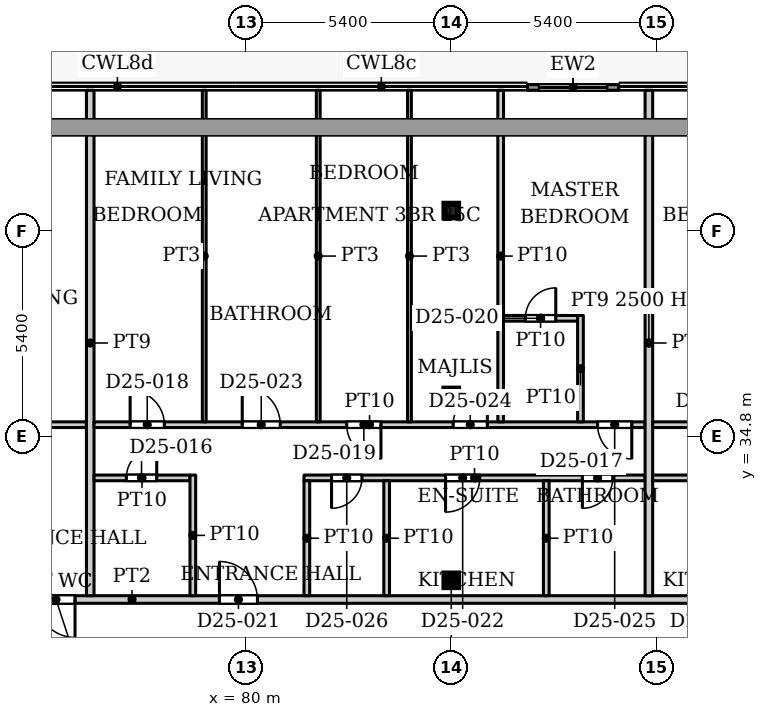
"""IFC4 building model, lengths in metres.
Left out: names, types, materials, properties, quantities, classifications, styles, units other than length and angle.
Written with IfcOpenShell. Run it as: python <this file> out.ifc"""

import sys

from ifc_helpers import new_model, si_unit, direction, frame, frame_2d, origin, origin_2d, place, context, subcontext, project, spatial, rectangle, hollow_rectangle, extrude, source, transform, mapped, element, fill, save


model = new_model("IFC4")
c1 = context("Model", 3, precision=1e-05, world=origin(), true_north=direction((0.0, 1.0)))
c2 = subcontext(c1, "Body", "Model", "MODEL_VIEW")
j1 = project(units=[si_unit("LENGTHUNIT", "METRE"), si_unit("PLANEANGLEUNIT", "RADIAN")], contexts=[c1])
p1 = place(None, origin())
s1 = spatial("IfcSite", under=j1, at=p1, CompositionType="ELEMENT")
p2 = place(p1, origin())
s2 = spatial("IfcBuilding", under=s1, at=p2, CompositionType="ELEMENT")
p3 = place(p2, frame((0.0, 0.0, 109.7)))
s3 = spatial("IfcBuildingStorey", under=s2, at=p3, CompositionType="ELEMENT", Elevation=109.7)
for number, where, z_axis, x_axis in (
    (1, (85.4, 31.005, 0.0), (0.0, 0.0, 1.0), (1.0, 0.0, 0.0)),
    (2, (85.4, 35.87, 0.0), (0.0, 0.0, 1.0), (1.0, 0.0, 0.0)),
    (3, (85.4, 40.735, 0.0), (0.0, 0.0, 1.0), (1.0, 0.0, 0.0)),
):
    element("IfcColumn", number, at=place(p3, frame(where, z_axis=z_axis, x_axis=x_axis)), inside=s3, PredefinedType="COLUMN", context=c2, shape_type="SweptSolid", body=[
        extrude(hollow_rectangle(XDim=0.356, YDim=0.356, WallThickness=0.016, InnerFilletRadius=0.016, OuterFilletRadius=0.032, at=origin_2d()), origin(), (0.0, 0.0, 1.0), 3.9),
    ])
p4 = place(p3, frame((87.406, 43.975, 0.0), z_axis=(0.0, 0.0, 1.0), x_axis=(1.0, 0.0, 0.0)))
e4 = element("IfcWall", 4, at=p4, inside=s3, PredefinedType="SOLIDWALL", context=c2, shape_type="SweptSolid", body=[
    extrude(rectangle(XDim=2.4, YDim=0.15, at=frame_2d((1.2, 0.0))), origin(), (0.0, 0.0, 1.0), 3.75),
])
p5 = place(p4, frame((0.3, 0.0, 0.0)))
e5 = element("IfcOpeningElement", 5, at=p5, cuts=e4, PredefinedType="OPENING", context=c2, shape_type="SweptSolid", body=[
    extrude(rectangle(XDim=1.8, YDim=2.4, at=frame_2d((0.9, 1.2))), frame((0.0, 0.085, 0.0), z_axis=(0.0, -1.0, 0.0), x_axis=(1.0, 0.0, 0.0)), (0.0, 0.0, 1.0), 0.17),
])
p6 = place(p3, frame((55.9, 30.5, 0.0), z_axis=(0.0, 0.0, 1.0), x_axis=(1.0, 0.0, 0.0)))
e6 = element("IfcWall", 6, at=p6, inside=s3, PredefinedType="PARTITIONING", context=c2, shape_type="SweptSolid", body=[
    extrude(rectangle(XDim=42.2, YDim=0.2, at=frame_2d((21.1, 0.0))), origin(), (0.0, 0.0, 1.0), 3.6),
])
p7 = place(p6, frame((9.75, 0.0, 0.0)))
e7 = element("IfcOpeningElement", 7, at=p7, cuts=e6, PredefinedType="OPENING", context=c2, shape_type="SweptSolid", body=[
    extrude(rectangle(XDim=1.0, YDim=2.1, at=frame_2d((0.5, 1.05))), frame((0.0, 0.11, 0.0), z_axis=(0.0, -1.0, 0.0), x_axis=(1.0, 0.0, 0.0)), (0.0, 0.0, 1.0), 0.22),
])
p8 = place(p6, frame((18.6, 0.0, 0.0)))
e8 = element("IfcOpeningElement", 8, at=p8, cuts=e6, PredefinedType="OPENING", context=c2, shape_type="SweptSolid", body=[
    extrude(rectangle(XDim=1.0, YDim=2.1, at=frame_2d((0.5, 1.05))), frame((0.0, 0.11, 0.0), z_axis=(0.0, -1.0, 0.0), x_axis=(1.0, 0.0, 0.0)), (0.0, 0.0, 1.0), 0.22),
])
p9 = place(p6, frame((23.4, 0.0, 0.0)))
e9 = element("IfcOpeningElement", 9, at=p9, cuts=e6, PredefinedType="OPENING", context=c2, shape_type="SweptSolid", body=[
    extrude(rectangle(XDim=1.0, YDim=2.1, at=frame_2d((0.5, 1.05))), frame((0.0, 0.11, 0.0), z_axis=(0.0, -1.0, 0.0), x_axis=(1.0, 0.0, 0.0)), (0.0, 0.0, 1.0), 0.22),
])
p10 = place(p6, frame((40.2, 0.0, 0.0)))
e10 = element("IfcOpeningElement", 10, at=p10, cuts=e6, PredefinedType="OPENING", context=c2, shape_type="SweptSolid", body=[
    extrude(rectangle(XDim=1.0, YDim=2.1, at=frame_2d((0.5, 1.05))), frame((0.0, 0.11, 0.0), z_axis=(0.0, -1.0, 0.0), x_axis=(1.0, 0.0, 0.0)), (0.0, 0.0, 1.0), 0.22),
])
p11 = place(p3, frame((67.3, 35.1, 0.0), z_axis=(0.0, 0.0, 1.0), x_axis=(1.0, 0.0, 0.0)))
e11 = element("IfcWall", 11, at=p11, inside=s3, PredefinedType="PARTITIONING", context=c2, shape_type="SweptSolid", body=[
    extrude(rectangle(XDim=8.5, YDim=0.15, at=frame_2d((4.25, 0.0))), origin(), (0.0, 0.0, 1.0), 3.6),
])
p12 = place(p11, frame((1.0, 0.0, 0.0)))
e12 = element("IfcOpeningElement", 12, at=p12, cuts=e11, PredefinedType="OPENING", context=c2, shape_type="SweptSolid", body=[
    extrude(rectangle(XDim=0.9, YDim=2.1, at=frame_2d((0.45, 1.05))), frame((0.0, 0.085, 0.0), z_axis=(0.0, -1.0, 0.0), x_axis=(1.0, 0.0, 0.0)), (0.0, 0.0, 1.0), 0.17),
])
p13 = place(p11, frame((5.7, 0.0, 0.0)))
e13 = element("IfcOpeningElement", 13, at=p13, cuts=e11, PredefinedType="OPENING", context=c2, shape_type="SweptSolid", body=[
    extrude(rectangle(XDim=1.0, YDim=2.1, at=frame_2d((0.5, 1.05))), frame((0.0, 0.085, 0.0), z_axis=(0.0, -1.0, 0.0), x_axis=(1.0, 0.0, 0.0)), (0.0, 0.0, 1.0), 0.17),
])
p14 = place(p3, frame((75.9, 30.6, 0.0), z_axis=(0.0, 0.0, 1.0), x_axis=(0.0, 1.0, 0.0)))
e14 = element("IfcWall", 14, at=p14, inside=s3, PredefinedType="PARTITIONING", context=c2, shape_type="SweptSolid", body=[
    extrude(rectangle(XDim=13.3, YDim=0.2, at=frame_2d((6.65, 0.0))), origin(), (0.0, 0.0, 1.0), 3.6),
])
p15 = place(p3, frame((76.0, 33.7, 0.0), z_axis=(0.0, 0.0, 1.0), x_axis=(1.0, 0.0, 0.0)))
e15 = element("IfcWall", 15, at=p15, inside=s3, PredefinedType="PARTITIONING", context=c2, shape_type="SweptSolid", body=[
    extrude(rectangle(XDim=2.525, YDim=0.15, at=frame_2d((1.262, 0.0))), origin(), (0.0, 0.0, 1.0), 3.6),
])
p16 = place(p15, frame((0.85, 0.0, 0.0)))
e16 = element("IfcOpeningElement", 16, at=p16, cuts=e15, PredefinedType="OPENING", context=c2, shape_type="SweptSolid", body=[
    extrude(rectangle(XDim=0.8, YDim=2.1, at=frame_2d((0.4, 1.05))), frame((0.0, 0.085, 0.0), z_axis=(0.0, -1.0, 0.0), x_axis=(1.0, 0.0, 0.0)), (0.0, 0.0, 1.0), 0.17),
])
p17 = place(p3, frame((76.0, 35.1, 0.0), z_axis=(0.0, 0.0, 1.0), x_axis=(1.0, 0.0, 0.0)))
e17 = element("IfcWall", 17, at=p17, inside=s3, PredefinedType="PARTITIONING", context=c2, shape_type="SweptSolid", body=[
    extrude(rectangle(XDim=14.5, YDim=0.15, at=frame_2d((7.25, 0.0))), origin(), (0.0, 0.0, 1.0), 3.6),
])
p18 = place(p17, frame((0.95, 0.0, 0.0)))
e18 = element("IfcOpeningElement", 18, at=p18, cuts=e17, PredefinedType="OPENING", context=c2, shape_type="SweptSolid", body=[
    extrude(rectangle(XDim=0.9, YDim=2.1, at=frame_2d((0.45, 1.05))), frame((0.0, 0.085, 0.0), z_axis=(0.0, -1.0, 0.0), x_axis=(1.0, 0.0, 0.0)), (0.0, 0.0, 1.0), 0.17),
])
p19 = place(p17, frame((6.65, 0.0, 0.0)))
e19 = element("IfcOpeningElement", 19, at=p19, cuts=e17, PredefinedType="OPENING", context=c2, shape_type="SweptSolid", body=[
    extrude(rectangle(XDim=0.9, YDim=2.1, at=frame_2d((0.45, 1.05))), frame((0.0, 0.085, 0.0), z_axis=(0.0, -1.0, 0.0), x_axis=(1.0, 0.0, 0.0)), (0.0, 0.0, 1.0), 0.17),
])
p20 = place(p17, frame((3.9, 0.0, 0.0)))
e20 = element("IfcOpeningElement", 20, at=p20, cuts=e17, PredefinedType="OPENING", context=c2, shape_type="SweptSolid", body=[
    extrude(rectangle(XDim=1.0, YDim=2.1, at=frame_2d((0.5, 1.05))), frame((0.0, 0.085, 0.0), z_axis=(0.0, -1.0, 0.0), x_axis=(1.0, 0.0, 0.0)), (0.0, 0.0, 1.0), 0.17),
])
p21 = place(p17, frame((9.45, 0.0, 0.0)))
e21 = element("IfcOpeningElement", 21, at=p21, cuts=e17, PredefinedType="OPENING", context=c2, shape_type="SweptSolid", body=[
    extrude(rectangle(XDim=0.9, YDim=2.1, at=frame_2d((0.45, 1.05))), frame((0.0, 0.085, 0.0), z_axis=(0.0, -1.0, 0.0), x_axis=(1.0, 0.0, 0.0)), (0.0, 0.0, 1.0), 0.17),
])
p22 = place(p17, frame((13.25, 0.0, 0.0)))
e22 = element("IfcOpeningElement", 22, at=p22, cuts=e17, PredefinedType="OPENING", context=c2, shape_type="SweptSolid", body=[
    extrude(rectangle(XDim=0.9, YDim=2.1, at=frame_2d((0.45, 1.05))), frame((0.0, 0.085, 0.0), z_axis=(0.0, -1.0, 0.0), x_axis=(1.0, 0.0, 0.0)), (0.0, 0.0, 1.0), 0.17),
])
p23 = place(p3, frame((78.6, 30.6, 0.0), z_axis=(0.0, 0.0, 1.0), x_axis=(0.0, 1.0, 0.0)))
e23 = element("IfcWall", 23, at=p23, inside=s3, PredefinedType="PARTITIONING", context=c2, shape_type="SweptSolid", body=[
    extrude(rectangle(XDim=3.175, YDim=0.15, at=frame_2d((1.587, 0.0))), origin(), (0.0, 0.0, 1.0), 3.6),
])
p24 = place(p3, frame((78.9, 35.175, 0.0), z_axis=(0.0, 0.0, 1.0), x_axis=(0.0, 1.0, 0.0)))
e24 = element("IfcWall", 24, at=p24, inside=s3, PredefinedType="PARTITIONING", context=c2, shape_type="SweptSolid", body=[
    extrude(rectangle(XDim=8.725, YDim=0.1, at=frame_2d((4.362, 0.0))), origin(), (0.0, 0.0, 1.0), 3.6),
])
p25 = place(p3, frame((81.525, 33.7, 0.0), z_axis=(0.0, 0.0, 1.0), x_axis=(1.0, 0.0, 0.0)))
e25 = element("IfcWall", 25, at=p25, inside=s3, PredefinedType="PARTITIONING", context=c2, shape_type="SweptSolid", body=[
    extrude(rectangle(XDim=8.975, YDim=0.15, at=frame_2d((4.488, 0.0))), origin(), (0.0, 0.0, 1.0), 3.6),
])
p26 = place(p25, frame((7.325, 0.0, 0.0)))
e26 = element("IfcOpeningElement", 26, at=p26, cuts=e25, PredefinedType="OPENING", context=c2, shape_type="SweptSolid", body=[
    extrude(rectangle(XDim=0.8, YDim=2.1, at=frame_2d((0.4, 1.05))), frame((0.0, 0.085, 0.0), z_axis=(0.0, -1.0, 0.0), x_axis=(1.0, 0.0, 0.0)), (0.0, 0.0, 1.0), 0.17),
])
p27 = place(p25, frame((3.725, 0.0, 0.0)))
e27 = element("IfcOpeningElement", 27, at=p27, cuts=e25, PredefinedType="OPENING", context=c2, shape_type="SweptSolid", body=[
    extrude(rectangle(XDim=0.9, YDim=2.1, at=frame_2d((0.45, 1.05))), frame((0.0, 0.085, 0.0), z_axis=(0.0, -1.0, 0.0), x_axis=(1.0, 0.0, 0.0)), (0.0, 0.0, 1.0), 0.17),
])
p28 = place(p25, frame((0.725, 0.0, 0.0)))
e28 = element("IfcOpeningElement", 28, at=p28, cuts=e25, PredefinedType="OPENING", context=c2, shape_type="SweptSolid", body=[
    extrude(rectangle(XDim=0.8, YDim=2.1, at=frame_2d((0.4, 1.05))), frame((0.0, 0.085, 0.0), z_axis=(0.0, -1.0, 0.0), x_axis=(1.0, 0.0, 0.0)), (0.0, 0.0, 1.0), 0.17),
])
p29 = place(p3, frame((81.6, 30.6, 0.0), z_axis=(0.0, 0.0, 1.0), x_axis=(0.0, 1.0, 0.0)))
e29 = element("IfcWall", 29, at=p29, inside=s3, PredefinedType="PARTITIONING", context=c2, shape_type="SweptSolid", body=[
    extrude(rectangle(XDim=3.025, YDim=0.15, at=frame_2d((1.512, 0.0))), origin(), (0.0, 0.0, 1.0), 3.6),
])
p30 = place(p3, frame((81.9, 35.175, 0.0), z_axis=(0.0, 0.0, 1.0), x_axis=(0.0, 1.0, 0.0)))
e30 = element("IfcWall", 30, at=p30, inside=s3, PredefinedType="PARTITIONING", context=c2, shape_type="SweptSolid", body=[
    extrude(rectangle(XDim=8.725, YDim=0.1, at=frame_2d((4.362, 0.0))), origin(), (0.0, 0.0, 1.0), 3.6),
])
p31 = place(p3, frame((83.7, 30.6, 0.0), z_axis=(0.0, 0.0, 1.0), x_axis=(0.0, 1.0, 0.0)))
e31 = element("IfcWall", 31, at=p31, inside=s3, PredefinedType="PARTITIONING", context=c2, shape_type="SweptSolid", body=[
    extrude(rectangle(XDim=3.025, YDim=0.15, at=frame_2d((1.512, 0.0))), origin(), (0.0, 0.0, 1.0), 3.6),
])
p32 = place(p3, frame((84.3, 35.175, 0.0), z_axis=(0.0, 0.0, 1.0), x_axis=(0.0, 1.0, 0.0)))
e32 = element("IfcWall", 32, at=p32, inside=s3, PredefinedType="PARTITIONING", context=c2, shape_type="SweptSolid", body=[
    extrude(rectangle(XDim=8.725, YDim=0.1, at=frame_2d((4.362, 0.0))), origin(), (0.0, 0.0, 1.0), 3.6),
])
p33 = place(p3, frame((86.7, 35.175, 0.0), z_axis=(0.0, 0.0, 1.0), x_axis=(0.0, 1.0, 0.0)))
e33 = element("IfcWall", 33, at=p33, inside=s3, PredefinedType="PARTITIONING", context=c2, shape_type="SweptSolid", body=[
    extrude(rectangle(XDim=8.725, YDim=0.15, at=frame_2d((4.362, 0.0))), origin(), (0.0, 0.0, 1.0), 3.6),
])
p34 = place(p3, frame((86.775, 37.9, 0.0), z_axis=(0.0, 0.0, 1.0), x_axis=(1.0, 0.0, 0.0)))
e34 = element("IfcWall", 34, at=p34, inside=s3, PredefinedType="PARTITIONING", context=c2, shape_type="SweptSolid", body=[
    extrude(rectangle(XDim=1.95, YDim=0.15, at=frame_2d((0.975, 0.0))), origin(), (0.0, 0.0, 1.0), 3.6),
])
p35 = place(p34, frame((0.575, 0.0, 0.0)))
e35 = element("IfcOpeningElement", 35, at=p35, cuts=e34, PredefinedType="OPENING", context=c2, shape_type="SweptSolid", body=[
    extrude(rectangle(XDim=0.8, YDim=2.1, at=frame_2d((0.4, 1.05))), frame((0.0, 0.085, 0.0), z_axis=(0.0, -1.0, 0.0), x_axis=(1.0, 0.0, 0.0)), (0.0, 0.0, 1.0), 0.17),
])
p36 = place(p3, frame((87.9, 30.6, 0.0), z_axis=(0.0, 0.0, 1.0), x_axis=(0.0, 1.0, 0.0)))
e36 = element("IfcWall", 36, at=p36, inside=s3, PredefinedType="PARTITIONING", context=c2, shape_type="SweptSolid", body=[
    extrude(rectangle(XDim=3.025, YDim=0.15, at=frame_2d((1.512, 0.0))), origin(), (0.0, 0.0, 1.0), 3.6),
])
p37 = place(p3, frame((88.8, 35.175, 0.0), z_axis=(0.0, 0.0, 1.0), x_axis=(0.0, 1.0, 0.0)))
e37 = element("IfcWall", 37, at=p37, inside=s3, PredefinedType="PARTITIONING", context=c2, shape_type="SweptSolid", body=[
    extrude(rectangle(XDim=2.8, YDim=0.15, at=frame_2d((1.4, 0.0))), origin(), (0.0, 0.0, 1.0), 3.6),
])
p38 = place(p3, frame((90.6, 30.6, 0.0), z_axis=(0.0, 0.0, 1.0), x_axis=(0.0, 1.0, 0.0)))
e38 = element("IfcWall", 38, at=p38, inside=s3, PredefinedType="PARTITIONING", context=c2, shape_type="SweptSolid", body=[
    extrude(rectangle(XDim=13.3, YDim=0.2, at=frame_2d((6.65, 0.0))), origin(), (0.0, 0.0, 1.0), 2.5),
])
p39 = place(p3, frame((90.7, 33.7, 0.0), z_axis=(0.0, 0.0, 1.0), x_axis=(1.0, 0.0, 0.0)))
e39 = element("IfcWall", 39, at=p39, inside=s3, PredefinedType="PARTITIONING", context=c2, shape_type="SweptSolid", body=[
    extrude(rectangle(XDim=5.075, YDim=0.15, at=frame_2d((2.538, 0.0))), origin(), (0.0, 0.0, 1.0), 3.6),
])
p40 = place(p39, frame((1.1, 0.0, 0.0)))
e40 = element("IfcOpeningElement", 40, at=p40, cuts=e39, PredefinedType="OPENING", context=c2, shape_type="SweptSolid", body=[
    extrude(rectangle(XDim=0.9, YDim=2.1, at=frame_2d((0.45, 1.05))), frame((0.0, 0.085, 0.0), z_axis=(0.0, -1.0, 0.0), x_axis=(1.0, 0.0, 0.0)), (0.0, 0.0, 1.0), 0.17),
])
p41 = place(p39, frame((3.7, 0.0, 0.0)))
e41 = element("IfcOpeningElement", 41, at=p41, cuts=e39, PredefinedType="OPENING", context=c2, shape_type="SweptSolid", body=[
    extrude(rectangle(XDim=0.8, YDim=2.1, at=frame_2d((0.4, 1.05))), frame((0.0, 0.085, 0.0), z_axis=(0.0, -1.0, 0.0), x_axis=(1.0, 0.0, 0.0)), (0.0, 0.0, 1.0), 0.17),
])
p42 = place(p3, frame((90.7, 35.1, 0.0), z_axis=(0.0, 0.0, 1.0), x_axis=(1.0, 0.0, 0.0)))
e42 = element("IfcWall", 42, at=p42, inside=s3, PredefinedType="PARTITIONING", context=c2, shape_type="SweptSolid", body=[
    extrude(rectangle(XDim=9.2, YDim=0.15, at=frame_2d((4.6, 0.0))), origin(), (0.0, 0.0, 1.0), 3.6),
])
p43 = place(p42, frame((1.25, 0.0, 0.0)))
e43 = element("IfcOpeningElement", 43, at=p43, cuts=e42, PredefinedType="OPENING", context=c2, shape_type="SweptSolid", body=[
    extrude(rectangle(XDim=0.9, YDim=2.1, at=frame_2d((0.45, 1.05))), frame((0.0, 0.085, 0.0), z_axis=(0.0, -1.0, 0.0), x_axis=(1.0, 0.0, 0.0)), (0.0, 0.0, 1.0), 0.17),
])
p44 = place(p42, frame((5.85, 0.0, 0.0)))
e44 = element("IfcOpeningElement", 44, at=p44, cuts=e42, PredefinedType="OPENING", context=c2, shape_type="SweptSolid", body=[
    extrude(rectangle(XDim=1.0, YDim=2.1, at=frame_2d((0.5, 1.05))), frame((0.0, 0.085, 0.0), z_axis=(0.0, -1.0, 0.0), x_axis=(1.0, 0.0, 0.0)), (0.0, 0.0, 1.0), 0.17),
])
m1 = source(origin(), c2, "Body", "SweptSolid", [
    extrude(rectangle(XDim=1.8, YDim=2.4, at=frame_2d((0.9, 1.2))), frame((0.0, 0.025, 0.0), z_axis=(0.0, -1.0, 0.0), x_axis=(1.0, 0.0, 0.0)), (0.0, 0.0, 1.0), 0.05),
])
p45 = place(p5, origin())
e45 = element("IfcDoor", 45, at=p45, inside=s3, OperationType="SLIDING_TO_LEFT", PredefinedType="DOOR", context=c2, shape_type="MappedRepresentation", body=[
    mapped(m1, transform((0.0, 0.0, 0.0), x_axis=(1.0, 0.0, 0.0), y_axis=(0.0, 1.0, 0.0), z_axis=(0.0, 0.0, 1.0), scale=1.0)),
])
fill(e5, e45)
m2 = source(origin(), c2, "Body", "SweptSolid", [
    extrude(rectangle(XDim=1.0, YDim=2.1, at=frame_2d((0.5, 1.05))), frame((0.0, 0.025, 0.0), z_axis=(0.0, -1.0, 0.0), x_axis=(1.0, 0.0, 0.0)), (0.0, 0.0, 1.0), 0.05),
])
p46 = place(p8, origin())
e46 = element("IfcDoor", 46, at=p46, inside=s3, OperationType="SINGLE_SWING_RIGHT", PredefinedType="DOOR", context=c2, shape_type="MappedRepresentation", body=[
    mapped(m2, transform((0.0, 0.0, 0.0), x_axis=(1.0, 0.0, 0.0), y_axis=(0.0, 1.0, 0.0), z_axis=(0.0, 0.0, 1.0), scale=1.0)),
])
fill(e8, e46)
m3 = source(origin(), c2, "Body", "SweptSolid", [
    extrude(rectangle(XDim=0.8, YDim=2.1, at=frame_2d((0.4, 1.05))), frame((0.0, 0.025, 0.0), z_axis=(0.0, -1.0, 0.0), x_axis=(1.0, 0.0, 0.0)), (0.0, 0.0, 1.0), 0.05),
])
p47 = place(p16, origin())
e47 = element("IfcDoor", 47, at=p47, inside=s3, OperationType="SINGLE_SWING_LEFT", PredefinedType="DOOR", context=c2, shape_type="MappedRepresentation", body=[
    mapped(m3, transform((0.0, 0.0, 0.0), x_axis=(1.0, 0.0, 0.0), y_axis=(0.0, 1.0, 0.0), z_axis=(0.0, 0.0, 1.0), scale=1.0)),
])
fill(e16, e47)
p48 = place(p26, origin())
e48 = element("IfcDoor", 48, at=p48, inside=s3, OperationType="SINGLE_SWING_RIGHT", PredefinedType="DOOR", context=c2, shape_type="MappedRepresentation", body=[
    mapped(m3, transform((0.0, 0.0, 0.0), x_axis=(1.0, 0.0, 0.0), y_axis=(0.0, 1.0, 0.0), z_axis=(0.0, 0.0, 1.0), scale=1.0)),
])
fill(e26, e48)
m4 = source(origin(), c2, "Body", "SweptSolid", [
    extrude(rectangle(XDim=0.9, YDim=2.1, at=frame_2d((0.45, 1.05))), frame((0.0, 0.025, 0.0), z_axis=(0.0, -1.0, 0.0), x_axis=(1.0, 0.0, 0.0)), (0.0, 0.0, 1.0), 0.05),
])
p49 = place(p18, origin())
e49 = element("IfcDoor", 49, at=p49, inside=s3, OperationType="SINGLE_SWING_LEFT", PredefinedType="DOOR", context=c2, shape_type="MappedRepresentation", body=[
    mapped(m4, transform((0.0, 0.0, 0.0), x_axis=(1.0, 0.0, 0.0), y_axis=(0.0, 1.0, 0.0), z_axis=(0.0, 0.0, 1.0), scale=1.0)),
])
fill(e18, e49)
p50 = place(p19, origin())
e50 = element("IfcDoor", 50, at=p50, inside=s3, OperationType="SINGLE_SWING_RIGHT", PredefinedType="DOOR", context=c2, shape_type="MappedRepresentation", body=[
    mapped(m4, transform((0.0, 0.0, 0.0), x_axis=(1.0, 0.0, 0.0), y_axis=(0.0, 1.0, 0.0), z_axis=(0.0, 0.0, 1.0), scale=1.0)),
])
fill(e19, e50)
p51 = place(p35, origin())
e51 = element("IfcDoor", 51, at=p51, inside=s3, OperationType="SINGLE_SWING_LEFT", PredefinedType="DOOR", context=c2, shape_type="MappedRepresentation", body=[
    mapped(m3, transform((0.0, 0.0, 0.0), x_axis=(1.0, 0.0, 0.0), y_axis=(0.0, 1.0, 0.0), z_axis=(0.0, 0.0, 1.0), scale=1.0)),
])
fill(e35, e51)
p52 = place(p9, origin())
e52 = element("IfcDoor", 52, at=p52, inside=s3, OperationType="SINGLE_SWING_LEFT", PredefinedType="DOOR", context=c2, shape_type="MappedRepresentation", body=[
    mapped(m2, transform((0.0, 0.0, 0.0), x_axis=(1.0, 0.0, 0.0), y_axis=(0.0, 1.0, 0.0), z_axis=(0.0, 0.0, 1.0), scale=1.0)),
])
fill(e9, e52)
p53 = place(p27, origin())
e53 = element("IfcDoor", 53, at=p53, inside=s3, OperationType="SINGLE_SWING_RIGHT", PredefinedType="DOOR", context=c2, shape_type="MappedRepresentation", body=[
    mapped(m4, transform((0.0, 0.0, 0.0), x_axis=(1.0, 0.0, 0.0), y_axis=(0.0, 1.0, 0.0), z_axis=(0.0, 0.0, 1.0), scale=1.0)),
])
fill(e27, e53)
m5 = source(origin(), c2, "Body", "SweptSolid", [
    extrude(rectangle(XDim=1.0, YDim=2.1, at=frame_2d((0.5, 1.05))), frame((0.0, 0.025, 0.0), z_axis=(0.0, -1.0, 0.0), x_axis=(1.0, 0.0, 0.0)), (0.0, 0.0, 1.0), 0.05),
])
p54 = place(p20, origin())
e54 = element("IfcDoor", 54, at=p54, inside=s3, OperationType="SINGLE_SWING_LEFT", PredefinedType="DOOR", context=c2, shape_type="MappedRepresentation", body=[
    mapped(m5, transform((0.0, 0.0, 0.0), x_axis=(1.0, 0.0, 0.0), y_axis=(0.0, 1.0, 0.0), z_axis=(0.0, 0.0, 1.0), scale=1.0)),
])
fill(e20, e54)
p55 = place(p21, origin())
e55 = element("IfcDoor", 55, at=p55, inside=s3, OperationType="SINGLE_SWING_LEFT", PredefinedType="DOOR", context=c2, shape_type="MappedRepresentation", body=[
    mapped(m4, transform((0.0, 0.0, 0.0), x_axis=(1.0, 0.0, 0.0), y_axis=(0.0, 1.0, 0.0), z_axis=(0.0, 0.0, 1.0), scale=1.0)),
])
fill(e21, e55)
p56 = place(p22, origin())
e56 = element("IfcDoor", 56, at=p56, inside=s3, OperationType="SINGLE_SWING_RIGHT", PredefinedType="DOOR", context=c2, shape_type="MappedRepresentation", body=[
    mapped(m4, transform((0.0, 0.0, 0.0), x_axis=(1.0, 0.0, 0.0), y_axis=(0.0, 1.0, 0.0), z_axis=(0.0, 0.0, 1.0), scale=1.0)),
])
fill(e22, e56)
p57 = place(p28, origin())
e57 = element("IfcDoor", 57, at=p57, inside=s3, OperationType="SINGLE_SWING_RIGHT", PredefinedType="DOOR", context=c2, shape_type="MappedRepresentation", body=[
    mapped(m3, transform((0.0, 0.0, 0.0), x_axis=(1.0, 0.0, 0.0), y_axis=(0.0, 1.0, 0.0), z_axis=(0.0, 0.0, 1.0), scale=1.0)),
])
fill(e28, e57)
save(model, sys.argv[1])
